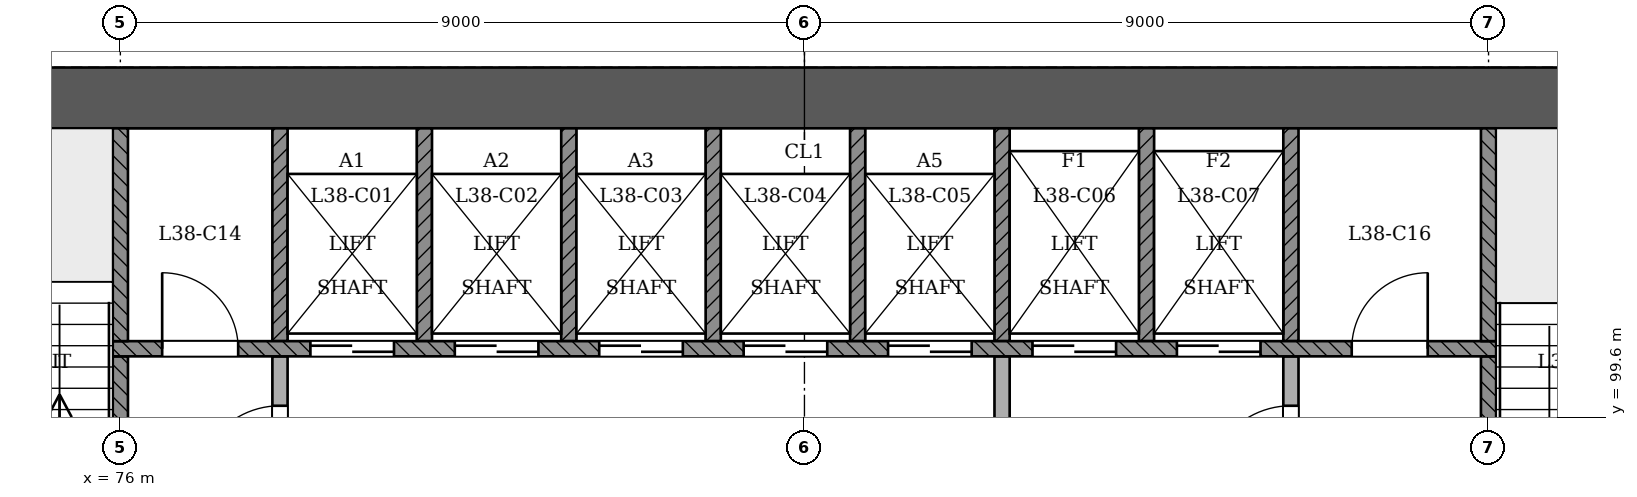
"""IFC4 building model, lengths in metres.
Left out: names, types, materials, properties, quantities, classifications, styles, units other than length and angle.
Written with IfcOpenShell. Run it as: python <this file> out.ifc"""

import sys

from ifc_helpers import new_model, si_unit, direction, frame, frame_2d, origin, place, context, subcontext, project, spatial, rectangle, extrude, element, fill, save


model = new_model("IFC4")
c1 = context("Model", 3, precision=1e-05, world=origin(), true_north=direction((0.0, 1.0)))
c2 = subcontext(c1, "Body", "Model", "MODEL_VIEW")
j1 = project(units=[si_unit("LENGTHUNIT", "METRE"), si_unit("PLANEANGLEUNIT", "RADIAN")], contexts=[c1])
p1 = place(None, origin())
s1 = spatial("IfcSite", under=j1, at=p1, CompositionType="ELEMENT")
p2 = place(p1, origin())
s2 = spatial("IfcBuilding", under=s1, at=p2, CompositionType="ELEMENT")
p3 = place(p2, frame((0.0, 0.0, 149.4)))
s3 = spatial("IfcBuildingStorey", under=s2, at=p3, CompositionType="ELEMENT", Elevation=149.4)
p4 = place(p3, frame((97.4, 103.8, 0.0), z_axis=(0.0, 0.0, 1.0), x_axis=(-1.0, 0.0, 0.0)))
e1 = element("IfcWall", 1, at=p4, inside=s3, PredefinedType="SHEAR", context=c2, shape_type="SweptSolid", body=[
    extrude(rectangle(XDim=25.2, YDim=0.8, at=frame_2d((12.6, 0.0))), origin(), (0.0, 0.0, 1.0), 3.6),
])
p5 = place(p3, frame((87.6, 93.4, 0.0), z_axis=(0.0, 0.0, 1.0), x_axis=(0.0, 1.0, 0.0)))
e2 = element("IfcWall", 2, at=p5, inside=s3, PredefinedType="PARTITIONING", context=c2, shape_type="SweptSolid", body=[
    extrude(rectangle(XDim=7.0, YDim=0.2, at=frame_2d((3.5, 0.0))), origin(), (0.0, 0.0, 1.0), 3.15),
])
p6 = place(p5, frame((4.45, 0.0, 0.0)))
e3 = element("IfcOpeningElement", 3, at=p6, cuts=e2, PredefinedType="OPENING", context=c2, shape_type="SweptSolid", body=[
    extrude(rectangle(XDim=1.1, YDim=2.1, at=frame_2d((0.55, 1.05))), frame((0.0, 0.11, 0.0), z_axis=(0.0, -1.0, 0.0), x_axis=(1.0, 0.0, 0.0)), (0.0, 0.0, 1.0), 0.221),
])
p7 = place(p3, frame((91.4, 96.2, 0.0), z_axis=(0.0, 0.0, 1.0), x_axis=(0.0, 1.0, 0.0)))
e4 = element("IfcWall", 4, at=p7, inside=s3, PredefinedType="PARTITIONING", context=c2, shape_type="SweptSolid", body=[
    extrude(rectangle(XDim=4.2, YDim=0.2, at=frame_2d((2.1, 0.0))), origin(), (0.0, 0.0, 1.0), 3.15),
])
p8 = place(p7, frame((2.45, 0.0, 0.0)))
e5 = element("IfcOpeningElement", 5, at=p8, cuts=e4, PredefinedType="OPENING", context=c2, shape_type="SweptSolid", body=[
    extrude(rectangle(XDim=1.1, YDim=2.1, at=frame_2d((0.55, 1.05))), frame((0.0, 0.11, 0.0), z_axis=(0.0, -1.0, 0.0), x_axis=(1.0, 0.0, 0.0)), (0.0, 0.0, 1.0), 0.221),
])
p9 = place(p3, frame((76.0, 96.7, 0.0), z_axis=(0.0, 0.0, 1.0), x_axis=(0.0, 1.0, 0.0)))
e6 = element("IfcWall", 6, at=p9, inside=s3, PredefinedType="SOLIDWALL", context=c2, shape_type="SweptSolid", body=[
    extrude(rectangle(XDim=3.7, YDim=0.2, at=frame_2d((1.85, 0.0))), origin(), (0.0, 0.0, 1.0), 3.15),
])
p10 = place(p9, frame((0.35, 0.0, 0.0)))
e7 = element("IfcOpeningElement", 7, at=p10, cuts=e6, PredefinedType="OPENING", context=c2, shape_type="SweptSolid", body=[
    extrude(rectangle(XDim=1.1, YDim=2.1, at=frame_2d((0.55, 1.05))), frame((0.0, 0.11, 0.0), z_axis=(0.0, -1.0, 0.0), x_axis=(1.0, 0.0, 0.0)), (0.0, 0.0, 1.0), 0.221),
])
p11 = place(p3, frame((78.1, 96.7, 0.0), z_axis=(0.0, 0.0, 1.0), x_axis=(0.0, 1.0, 0.0)))
e8 = element("IfcWall", 8, at=p11, inside=s3, PredefinedType="PARTITIONING", context=c2, shape_type="SweptSolid", body=[
    extrude(rectangle(XDim=3.7, YDim=0.2, at=frame_2d((1.85, 0.0))), origin(), (0.0, 0.0, 1.0), 3.15),
])
p12 = place(p11, frame((1.95, 0.0, 0.0)))
e9 = element("IfcOpeningElement", 9, at=p12, cuts=e8, PredefinedType="OPENING", context=c2, shape_type="SweptSolid", body=[
    extrude(rectangle(XDim=1.1, YDim=2.1, at=frame_2d((0.55, 1.05))), frame((0.0, 0.11, 0.0), z_axis=(0.0, -1.0, 0.0), x_axis=(1.0, 0.0, 0.0)), (0.0, 0.0, 1.0), 0.221),
])
p13 = place(p3, frame((94.0, 96.7, 0.0), z_axis=(0.0, 0.0, 1.0), x_axis=(0.0, 1.0, 0.0)))
e10 = element("IfcWall", 10, at=p13, inside=s3, PredefinedType="SOLIDWALL", context=c2, shape_type="SweptSolid", body=[
    extrude(rectangle(XDim=3.7, YDim=0.2, at=frame_2d((1.85, 0.0))), origin(), (0.0, 0.0, 1.0), 3.15),
])
p14 = place(p13, frame((0.35, 0.0, 0.0)))
e11 = element("IfcOpeningElement", 11, at=p14, cuts=e10, PredefinedType="OPENING", context=c2, shape_type="SweptSolid", body=[
    extrude(rectangle(XDim=1.1, YDim=2.1, at=frame_2d((0.55, 1.05))), frame((0.0, 0.11, 0.0), z_axis=(0.0, -1.0, 0.0), x_axis=(1.0, 0.0, 0.0)), (0.0, 0.0, 1.0), 0.221),
])
p15 = place(p3, frame((75.9, 100.5, 0.0), z_axis=(0.0, 0.0, 1.0), x_axis=(1.0, 0.0, 0.0)))
e12 = element("IfcWall", 12, at=p15, inside=s3, PredefinedType="SOLIDWALL", context=c2, shape_type="SweptSolid", body=[
    extrude(rectangle(XDim=18.2, YDim=0.2, at=frame_2d((9.1, 0.0))), origin(), (0.0, 0.0, 1.0), 3.15),
])
p16 = place(p15, frame((2.6, 0.0, 0.0)))
e13 = element("IfcOpeningElement", 13, at=p16, cuts=e12, PredefinedType="OPENING", context=c2, shape_type="SweptSolid", body=[
    extrude(rectangle(XDim=1.1, YDim=2.1, at=frame_2d((0.55, 1.05))), frame((0.0, 0.11, 0.0), z_axis=(0.0, -1.0, 0.0), x_axis=(1.0, 0.0, 0.0)), (0.0, 0.0, 1.0), 0.221),
])
p17 = place(p15, frame((4.5, 0.0, 0.0)))
e14 = element("IfcOpeningElement", 14, at=p17, cuts=e12, PredefinedType="OPENING", context=c2, shape_type="SweptSolid", body=[
    extrude(rectangle(XDim=1.1, YDim=2.1, at=frame_2d((0.55, 1.05))), frame((0.0, 0.11, 0.0), z_axis=(0.0, -1.0, 0.0), x_axis=(1.0, 0.0, 0.0)), (0.0, 0.0, 1.0), 0.221),
])
p18 = place(p15, frame((6.4, 0.0, 0.0)))
e15 = element("IfcOpeningElement", 15, at=p18, cuts=e12, PredefinedType="OPENING", context=c2, shape_type="SweptSolid", body=[
    extrude(rectangle(XDim=1.1, YDim=2.1, at=frame_2d((0.55, 1.05))), frame((0.0, 0.11, 0.0), z_axis=(0.0, -1.0, 0.0), x_axis=(1.0, 0.0, 0.0)), (0.0, 0.0, 1.0), 0.221),
])
p19 = place(p15, frame((8.3, 0.0, 0.0)))
e16 = element("IfcOpeningElement", 16, at=p19, cuts=e12, PredefinedType="OPENING", context=c2, shape_type="SweptSolid", body=[
    extrude(rectangle(XDim=1.1, YDim=2.1, at=frame_2d((0.55, 1.05))), frame((0.0, 0.11, 0.0), z_axis=(0.0, -1.0, 0.0), x_axis=(1.0, 0.0, 0.0)), (0.0, 0.0, 1.0), 0.221),
])
p20 = place(p15, frame((10.2, 0.0, 0.0)))
e17 = element("IfcOpeningElement", 17, at=p20, cuts=e12, PredefinedType="OPENING", context=c2, shape_type="SweptSolid", body=[
    extrude(rectangle(XDim=1.1, YDim=2.1, at=frame_2d((0.55, 1.05))), frame((0.0, 0.11, 0.0), z_axis=(0.0, -1.0, 0.0), x_axis=(1.0, 0.0, 0.0)), (0.0, 0.0, 1.0), 0.221),
])
p21 = place(p15, frame((12.1, 0.0, 0.0)))
e18 = element("IfcOpeningElement", 18, at=p21, cuts=e12, PredefinedType="OPENING", context=c2, shape_type="SweptSolid", body=[
    extrude(rectangle(XDim=1.1, YDim=2.1, at=frame_2d((0.55, 1.05))), frame((0.0, 0.11, 0.0), z_axis=(0.0, -1.0, 0.0), x_axis=(1.0, 0.0, 0.0)), (0.0, 0.0, 1.0), 0.221),
])
p22 = place(p15, frame((14.0, 0.0, 0.0)))
e19 = element("IfcOpeningElement", 19, at=p22, cuts=e12, PredefinedType="OPENING", context=c2, shape_type="SweptSolid", body=[
    extrude(rectangle(XDim=1.1, YDim=2.1, at=frame_2d((0.55, 1.05))), frame((0.0, 0.11, 0.0), z_axis=(0.0, -1.0, 0.0), x_axis=(1.0, 0.0, 0.0)), (0.0, 0.0, 1.0), 0.221),
])
p23 = place(p15, frame((0.65, 0.0, 0.0)))
e20 = element("IfcOpeningElement", 20, at=p23, cuts=e12, PredefinedType="OPENING", context=c2, shape_type="SweptSolid", body=[
    extrude(rectangle(XDim=1.0, YDim=2.1, at=frame_2d((0.5, 1.05))), frame((0.0, 0.11, 0.0), z_axis=(0.0, -1.0, 0.0), x_axis=(1.0, 0.0, 0.0)), (0.0, 0.0, 1.0), 0.221),
])
p24 = place(p15, frame((16.3, 0.0, 0.0)))
e21 = element("IfcOpeningElement", 21, at=p24, cuts=e12, PredefinedType="OPENING", context=c2, shape_type="SweptSolid", body=[
    extrude(rectangle(XDim=1.0, YDim=2.1, at=frame_2d((0.5, 1.05))), frame((0.0, 0.11, 0.0), z_axis=(0.0, -1.0, 0.0), x_axis=(1.0, 0.0, 0.0)), (0.0, 0.0, 1.0), 0.221),
])
for number, where, z_axis, x_axis in (
    (22, (76.0, 100.6, 0.0), (0.0, 0.0, 1.0), (0.0, 1.0, 0.0)),
    (23, (78.1, 100.6, 0.0), (0.0, 0.0, 1.0), (0.0, 1.0, 0.0)),
    (24, (80.0, 100.6, 0.0), (0.0, 0.0, 1.0), (0.0, 1.0, 0.0)),
    (25, (81.9, 100.6, 0.0), (0.0, 0.0, 1.0), (0.0, 1.0, 0.0)),
    (26, (83.8, 100.6, 0.0), (0.0, 0.0, 1.0), (0.0, 1.0, 0.0)),
    (27, (85.7, 100.6, 0.0), (0.0, 0.0, 1.0), (0.0, 1.0, 0.0)),
    (28, (87.6, 100.6, 0.0), (0.0, 0.0, 1.0), (0.0, 1.0, 0.0)),
    (29, (89.5, 100.6, 0.0), (0.0, 0.0, 1.0), (0.0, 1.0, 0.0)),
    (30, (91.4, 100.6, 0.0), (0.0, 0.0, 1.0), (0.0, 1.0, 0.0)),
    (31, (94.0, 100.6, 0.0), (0.0, 0.0, 1.0), (0.0, 1.0, 0.0)),
):
    element("IfcWall", number, at=place(p3, frame(where, z_axis=z_axis, x_axis=x_axis)), inside=s3, PredefinedType="SOLIDWALL", context=c2, shape_type="SweptSolid", body=[
        extrude(rectangle(XDim=2.8, YDim=0.2, at=frame_2d((1.4, 0.0))), origin(), (0.0, 0.0, 1.0), 3.15),
    ])
p25 = place(p16, origin())
e32 = element("IfcDoor", 32, at=p25, inside=s3, OperationType="SLIDING_TO_RIGHT", PredefinedType="NOTDEFINED", context=c2, shape_type="SweptSolid", body=[
    extrude(rectangle(XDim=1.1, YDim=2.1, at=frame_2d((0.55, 1.05))), frame((0.0, 0.025, 0.0), z_axis=(0.0, -1.0, 0.0), x_axis=(1.0, 0.0, 0.0)), (0.0, 0.0, 1.0), 0.05),
])
fill(e13, e32)
p26 = place(p17, origin())
e33 = element("IfcDoor", 33, at=p26, inside=s3, OperationType="SLIDING_TO_LEFT", PredefinedType="NOTDEFINED", context=c2, shape_type="SweptSolid", body=[
    extrude(rectangle(XDim=1.1, YDim=2.1, at=frame_2d((0.55, 1.05))), frame((0.0, 0.025, 0.0), z_axis=(0.0, -1.0, 0.0), x_axis=(1.0, 0.0, 0.0)), (0.0, 0.0, 1.0), 0.05),
])
fill(e14, e33)
p27 = place(p18, origin())
e34 = element("IfcDoor", 34, at=p27, inside=s3, OperationType="SLIDING_TO_RIGHT", PredefinedType="NOTDEFINED", context=c2, shape_type="SweptSolid", body=[
    extrude(rectangle(XDim=1.1, YDim=2.1, at=frame_2d((0.55, 1.05))), frame((0.0, 0.025, 0.0), z_axis=(0.0, -1.0, 0.0), x_axis=(1.0, 0.0, 0.0)), (0.0, 0.0, 1.0), 0.05),
])
fill(e15, e34)
p28 = place(p19, origin())
e35 = element("IfcDoor", 35, at=p28, inside=s3, OperationType="SLIDING_TO_LEFT", PredefinedType="NOTDEFINED", context=c2, shape_type="SweptSolid", body=[
    extrude(rectangle(XDim=1.1, YDim=2.1, at=frame_2d((0.55, 1.05))), frame((0.0, 0.025, 0.0), z_axis=(0.0, -1.0, 0.0), x_axis=(1.0, 0.0, 0.0)), (0.0, 0.0, 1.0), 0.05),
])
fill(e16, e35)
p29 = place(p20, origin())
e36 = element("IfcDoor", 36, at=p29, inside=s3, OperationType="SLIDING_TO_RIGHT", PredefinedType="NOTDEFINED", context=c2, shape_type="SweptSolid", body=[
    extrude(rectangle(XDim=1.1, YDim=2.1, at=frame_2d((0.55, 1.05))), frame((0.0, 0.025, 0.0), z_axis=(0.0, -1.0, 0.0), x_axis=(1.0, 0.0, 0.0)), (0.0, 0.0, 1.0), 0.05),
])
fill(e17, e36)
p30 = place(p21, origin())
e37 = element("IfcDoor", 37, at=p30, inside=s3, OperationType="SLIDING_TO_RIGHT", PredefinedType="NOTDEFINED", context=c2, shape_type="SweptSolid", body=[
    extrude(rectangle(XDim=1.1, YDim=2.1, at=frame_2d((0.55, 1.05))), frame((0.0, 0.025, 0.0), z_axis=(0.0, -1.0, 0.0), x_axis=(1.0, 0.0, 0.0)), (0.0, 0.0, 1.0), 0.05),
])
fill(e18, e37)
p31 = place(p22, origin())
e38 = element("IfcDoor", 38, at=p31, inside=s3, OperationType="SLIDING_TO_LEFT", PredefinedType="NOTDEFINED", context=c2, shape_type="SweptSolid", body=[
    extrude(rectangle(XDim=1.1, YDim=2.1, at=frame_2d((0.55, 1.05))), frame((0.0, 0.025, 0.0), z_axis=(0.0, -1.0, 0.0), x_axis=(1.0, 0.0, 0.0)), (0.0, 0.0, 1.0), 0.05),
])
fill(e19, e38)
p32 = place(p12, origin())
e39 = element("IfcDoor", 39, at=p32, inside=s3, OperationType="SINGLE_SWING_LEFT", PredefinedType="NOTDEFINED", context=c2, shape_type="SweptSolid", body=[
    extrude(rectangle(XDim=1.1, YDim=2.1, at=frame_2d((0.55, 1.05))), frame((0.0, 0.025, 0.0), z_axis=(0.0, -1.0, 0.0), x_axis=(1.0, 0.0, 0.0)), (0.0, 0.0, 1.0), 0.05),
])
fill(e9, e39)
p33 = place(p8, origin())
e40 = element("IfcDoor", 40, at=p33, inside=s3, OperationType="SINGLE_SWING_LEFT", PredefinedType="NOTDEFINED", context=c2, shape_type="SweptSolid", body=[
    extrude(rectangle(XDim=1.1, YDim=2.1, at=frame_2d((0.55, 1.05))), frame((0.0, 0.025, 0.0), z_axis=(0.0, -1.0, 0.0), x_axis=(1.0, 0.0, 0.0)), (0.0, 0.0, 1.0), 0.05),
])
fill(e5, e40)
p34 = place(p23, origin())
e41 = element("IfcDoor", 41, at=p34, inside=s3, OperationType="SINGLE_SWING_LEFT", PredefinedType="NOTDEFINED", context=c2, shape_type="SweptSolid", body=[
    extrude(rectangle(XDim=1.0, YDim=2.1, at=frame_2d((0.5, 1.05))), frame((0.0, 0.025, 0.0), z_axis=(0.0, -1.0, 0.0), x_axis=(1.0, 0.0, 0.0)), (0.0, 0.0, 1.0), 0.05),
])
fill(e20, e41)
p35 = place(p24, origin())
e42 = element("IfcDoor", 42, at=p35, inside=s3, OperationType="SINGLE_SWING_RIGHT", PredefinedType="NOTDEFINED", context=c2, shape_type="SweptSolid", body=[
    extrude(rectangle(XDim=1.0, YDim=2.1, at=frame_2d((0.5, 1.05))), frame((0.0, 0.025, 0.0), z_axis=(0.0, -1.0, 0.0), x_axis=(1.0, 0.0, 0.0)), (0.0, 0.0, 1.0), 0.05),
])
fill(e21, e42)
save(model, sys.argv[1])
